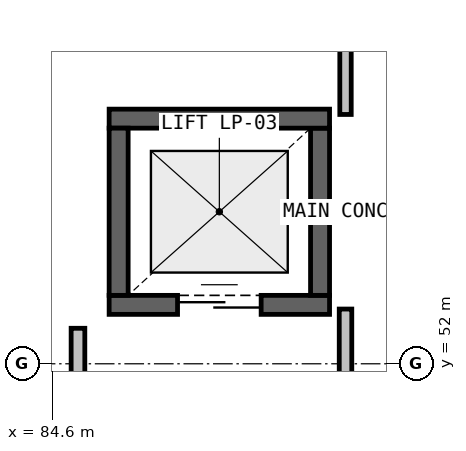
"""IFC4 building model, lengths in metres.
Left out: names, types, materials, properties, quantities, classifications, styles, units other than length and angle.
Written with IfcOpenShell. Run it as: python <this file> out.ifc"""

import sys

from ifc_helpers import new_model, si_unit, direction, frame, frame_2d, origin, place, context, subcontext, project, spatial, rectangle, extrude, element, fill, save


model = new_model("IFC4")
c1 = context("Model", 3, precision=1e-05, world=origin(), true_north=direction((0.0, 1.0)))
c2 = subcontext(c1, "Body", "Model", "MODEL_VIEW")
j1 = project(units=[si_unit("LENGTHUNIT", "METRE"), si_unit("PLANEANGLEUNIT", "RADIAN")], contexts=[c1])
p1 = place(None, origin())
s1 = spatial("IfcSite", under=j1, at=p1, CompositionType="ELEMENT")
p2 = place(p1, origin())
s2 = spatial("IfcBuilding", under=s1, at=p2, CompositionType="ELEMENT")
p3 = place(p2, origin())
s3 = spatial("IfcBuildingStorey", under=s2, at=p3, CompositionType="ELEMENT", Elevation=0.0)
p4 = place(p3, frame((85.35, 52.775, 0.0), z_axis=(0.0, 0.0, 1.0), x_axis=(1.0, 0.0, 0.0)))
e1 = element("IfcWall", 1, at=p4, inside=s3, PredefinedType="SHEAR", context=c2, shape_type="SweptSolid", body=[
    extrude(rectangle(XDim=2.9, YDim=0.25, at=frame_2d((1.45, 0.0))), origin(), (0.0, 0.0, 1.0), 5.08),
])
p5 = place(p4, frame((0.9, 0.0, 0.0)))
e2 = element("IfcOpeningElement", 2, at=p5, cuts=e1, PredefinedType="OPENING", context=c2, shape_type="SweptSolid", body=[
    extrude(rectangle(XDim=1.1, YDim=2.15, at=frame_2d((0.55, 1.075))), frame((0.0, 0.135, 0.0), z_axis=(0.0, -1.0, 0.0), x_axis=(1.0, 0.0, 0.0)), (0.0, 0.0, 1.0), 0.27),
])
p6 = place(p3, frame((88.125, 52.9, 0.0), z_axis=(0.0, 0.0, 1.0), x_axis=(0.0, 1.0, 0.0)))
e3 = element("IfcWall", 3, at=p6, inside=s3, PredefinedType="SHEAR", context=c2, shape_type="SweptSolid", body=[
    extrude(rectangle(XDim=2.2, YDim=0.25, at=frame_2d((1.1, 0.0))), origin(), (0.0, 0.0, 1.0), 5.08),
])
p7 = place(p3, frame((88.25, 55.225, 0.0), z_axis=(0.0, 0.0, 1.0), x_axis=(-1.0, 0.0, 0.0)))
e4 = element("IfcWall", 4, at=p7, inside=s3, PredefinedType="SHEAR", context=c2, shape_type="SweptSolid", body=[
    extrude(rectangle(XDim=2.9, YDim=0.25, at=frame_2d((1.45, 0.0))), origin(), (0.0, 0.0, 1.0), 5.08),
])
p8 = place(p3, frame((85.475, 55.1, 0.0), z_axis=(0.0, 0.0, 1.0), x_axis=(0.0, -1.0, 0.0)))
e5 = element("IfcWall", 5, at=p8, inside=s3, PredefinedType="SHEAR", context=c2, shape_type="SweptSolid", body=[
    extrude(rectangle(XDim=2.2, YDim=0.25, at=frame_2d((1.1, 0.0))), origin(), (0.0, 0.0, 1.0), 5.08),
])
p9 = place(p3, frame((84.94, 52.467, 0.0), z_axis=(0.0, 0.0, 1.0), x_axis=(0.0, -1.0, 0.0)))
e6 = element("IfcWall", 6, at=p9, inside=s3, PredefinedType="PARTITIONING", context=c2, shape_type="SweptSolid", body=[
    extrude(rectangle(XDim=3.616, YDim=0.18, at=frame_2d((1.808, 0.0))), origin(), (0.0, 0.0, 1.0), 5.08),
])
p10 = place(p3, frame((88.46, 41.12, 0.0), z_axis=(0.0, 0.0, 1.0), x_axis=(0.0, 1.0, 0.0)))
e7 = element("IfcWall", 7, at=p10, inside=s3, PredefinedType="PARTITIONING", context=c2, shape_type="SweptSolid", body=[
    extrude(rectangle(XDim=11.6, YDim=0.165, at=frame_2d((5.8, 0.0))), origin(), (0.0, 0.0, 1.0), 5.08),
])
p11 = place(p3, frame((88.46, 55.28, 0.0), z_axis=(0.0, 0.0, 1.0), x_axis=(0.0, 1.0, 0.0)))
e8 = element("IfcWall", 8, at=p11, inside=s3, PredefinedType="PARTITIONING", context=c2, shape_type="SweptSolid", body=[
    extrude(rectangle(XDim=10.755, YDim=0.15, at=frame_2d((5.377, 0.0))), origin(), (0.0, 0.0, 1.0), 5.08),
])
p12 = place(p5, origin())
e9 = element("IfcDoor", 9, at=p12, inside=s3, OperationType="DOUBLE_DOOR_SLIDING", PredefinedType="DOOR", context=c2, shape_type="SweptSolid", body=[
    extrude(rectangle(XDim=1.1, YDim=2.15, at=frame_2d((0.55, 1.075))), frame((0.0, 0.025, 0.0), z_axis=(0.0, -1.0, 0.0), x_axis=(1.0, 0.0, 0.0)), (0.0, 0.0, 1.0), 0.05),
])
fill(e2, e9)
save(model, sys.argv[1])
